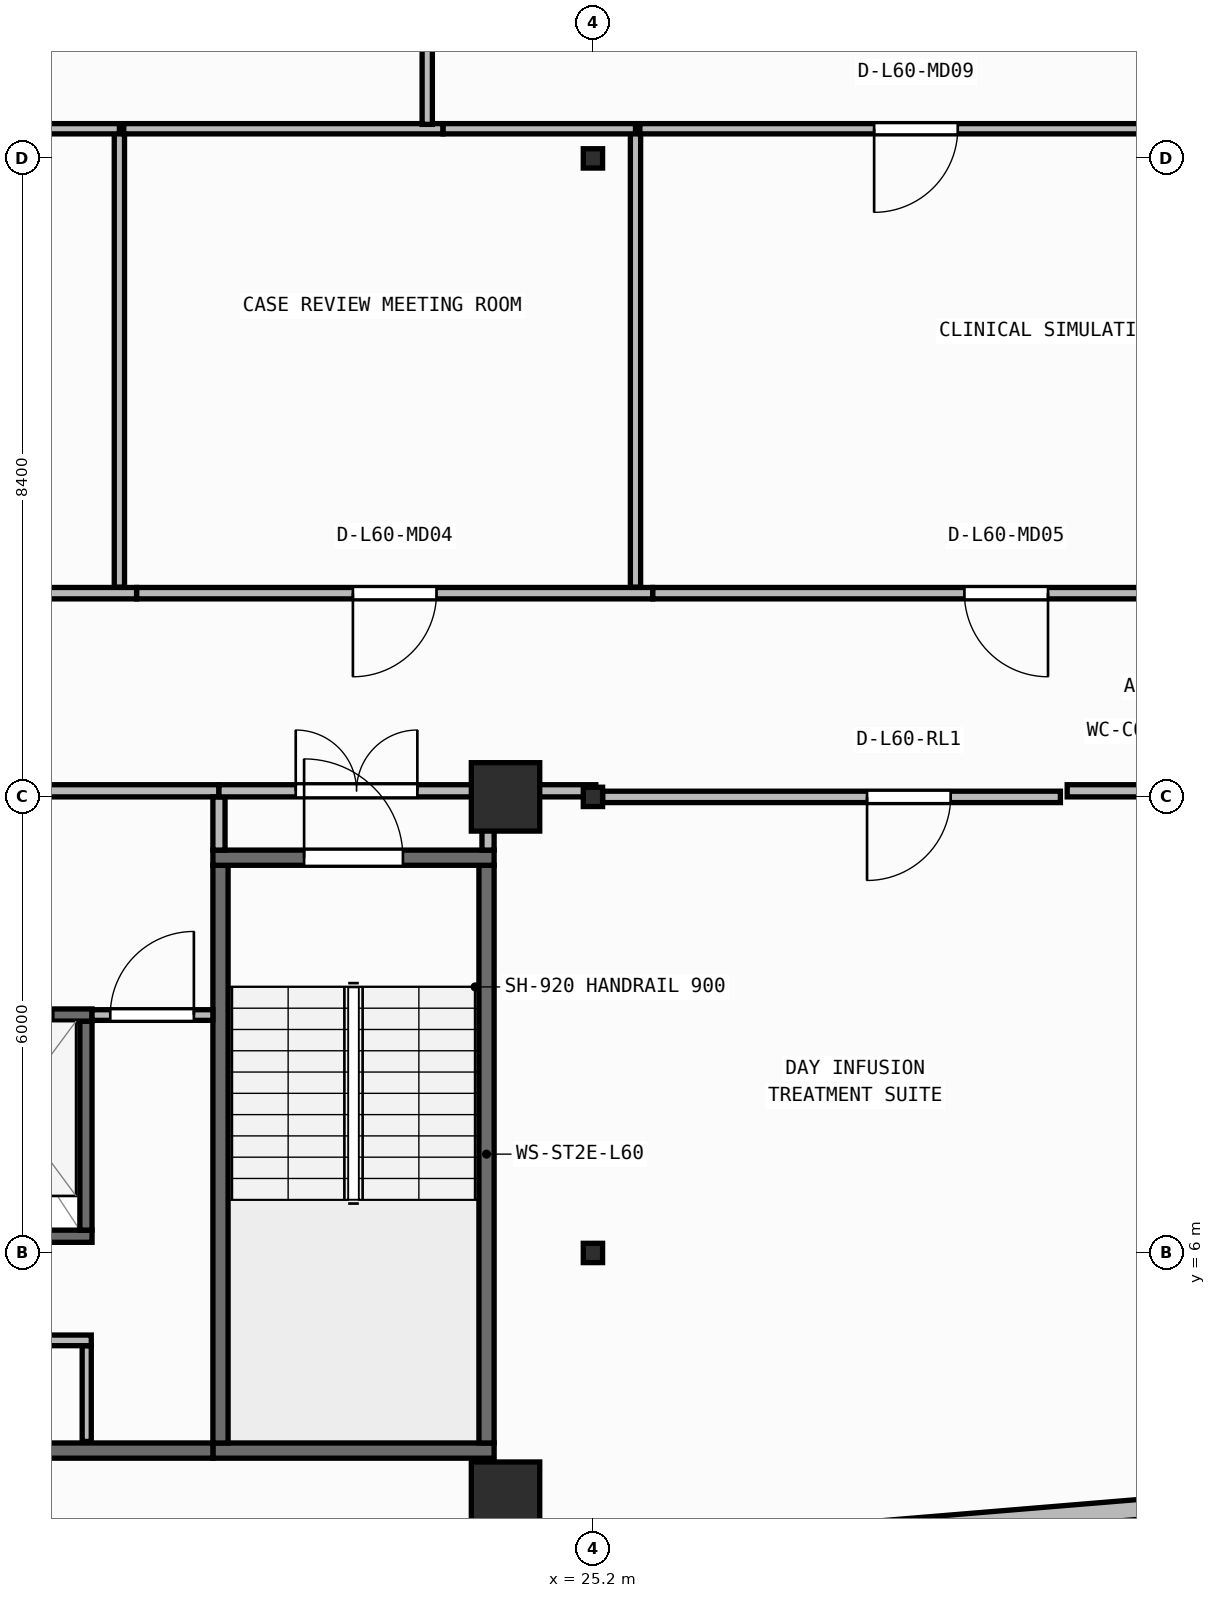
"""IFC4 building model, lengths in metres.
Left out: names, types, materials, properties, quantities, classifications, styles, units other than length and angle.
Written with IfcOpenShell. Run it as: python <this file> out.ifc"""

import sys

from ifc_helpers import new_model, si_unit, direction, frame, frame_2d, origin, origin_2d, place, context, subcontext, project, spatial, rectangle, i_section, extrude, element, fill, save


model = new_model("IFC4")
c1 = context("Model", 3, precision=1e-05, world=origin(), true_north=direction((0.0, 1.0)))
c2 = subcontext(c1, "Body", "Model", "MODEL_VIEW")
j1 = project(units=[si_unit("LENGTHUNIT", "METRE"), si_unit("PLANEANGLEUNIT", "RADIAN")], contexts=[c1])
p1 = place(None, origin())
s1 = spatial("IfcSite", under=j1, at=p1, CompositionType="ELEMENT")
p2 = place(p1, origin())
s2 = spatial("IfcBuilding", under=s1, at=p2, CompositionType="ELEMENT")
p3 = place(p2, frame((0.0, 0.0, 244.7)))
s3 = spatial("IfcBuildingStorey", under=s2, at=p3, CompositionType="ELEMENT", Elevation=244.7)
p4 = place(p3, frame((24.05, 2.8, 0.0), z_axis=(0.0, 0.0, 1.0), x_axis=(1.0, 0.0, 0.0)))
e1 = element("IfcColumn", 1, at=p4, inside=s3, PredefinedType="COLUMN", context=c2, shape_type="SweptSolid", body=[
    extrude(rectangle(XDim=0.9, YDim=0.9, at=origin_2d()), origin(), (0.0, 0.0, 1.0), 3.95),
])
p5 = place(p3, frame((25.2, 6.0, 0.0), z_axis=(0.0, 0.0, 1.0), x_axis=(1.0, 0.0, 0.0)))
e2 = element("IfcColumn", 2, at=p5, inside=s3, PredefinedType="COLUMN", context=c2, shape_type="SweptSolid", body=[
    extrude(i_section(OverallWidth=0.254, OverallDepth=0.254, WebThickness=0.009, FlangeThickness=0.014, FilletRadius=0.013, at=origin_2d()), origin(), (0.0, 0.0, 1.0), 3.95),
])
p6 = place(p3, frame((24.05, 12.0, 0.0), z_axis=(0.0, 0.0, 1.0), x_axis=(1.0, 0.0, 0.0)))
e3 = element("IfcColumn", 3, at=p6, inside=s3, PredefinedType="COLUMN", context=c2, shape_type="SweptSolid", body=[
    extrude(rectangle(XDim=0.9, YDim=0.9, at=origin_2d()), origin(), (0.0, 0.0, 1.0), 3.95),
])
for number, where, z_axis, x_axis in (
    (4, (25.2, 12.0, 0.0), (0.0, 0.0, 1.0), (1.0, 0.0, 0.0)),
    (5, (25.2, 20.4, 0.0), (0.0, 0.0, 1.0), (1.0, 0.0, 0.0)),
):
    element("IfcColumn", number, at=place(p3, frame(where, z_axis=z_axis, x_axis=x_axis)), inside=s3, PredefinedType="COLUMN", context=c2, shape_type="SweptSolid", body=[
        extrude(i_section(OverallWidth=0.254, OverallDepth=0.254, WebThickness=0.009, FlangeThickness=0.014, FilletRadius=0.013, at=origin_2d()), origin(), (0.0, 0.0, 1.0), 3.95),
    ])
p7 = place(p3, frame((2.66, 0.174, 0.0), z_axis=(0.0, 0.0, 1.0), x_axis=(0.996611813627, 0.082248969229, 0.0)))
e6 = element("IfcWall", 6, at=p7, inside=s3, PredefinedType="STANDARD", context=c2, shape_type="SweptSolid", body=[
    extrude(rectangle(XDim=41.019, YDim=0.26, at=frame_2d((20.51, 0.0))), origin(), (0.0, 0.0, 1.0), 3.71),
])
p8 = place(p7, frame((19.31, 0.0, 0.9)))
e7 = element("IfcOpeningElement", 7, at=p8, cuts=e6, PredefinedType="OPENING", context=c2, shape_type="SweptSolid", body=[
    extrude(rectangle(XDim=2.4, YDim=1.65, at=frame_2d((1.2, 0.825))), frame((0.0, 0.14, 0.0), z_axis=(0.0, -1.0, 0.0), x_axis=(1.0, 0.0, 0.0)), (0.0, 0.0, 1.0), 0.28),
])
p9 = place(p3, frame((20.2, 3.4, 0.0), z_axis=(0.0, 0.0, 1.0), x_axis=(1.0, 0.0, 0.0)))
e8 = element("IfcWall", 8, at=p9, inside=s3, PredefinedType="SHEAR", context=c2, shape_type="SweptSolid", body=[
    extrude(rectangle(XDim=3.7, YDim=0.2, at=frame_2d((1.85, 0.0))), origin(), (0.0, 0.0, 1.0), 3.71),
])
for number, where, z_axis, x_axis in (
    (9, (20.3, 3.5, 0.0), (0.0, 0.0, 1.0), (0.0, 1.0, 0.0)),
    (10, (23.8, 3.5, 0.0), (0.0, 0.0, 1.0), (0.0, 1.0, 0.0)),
):
    element("IfcWall", number, at=place(p3, frame(where, z_axis=z_axis, x_axis=x_axis)), inside=s3, PredefinedType="SHEAR", context=c2, shape_type="SweptSolid", body=[
        extrude(rectangle(XDim=7.6, YDim=0.2, at=frame_2d((3.8, 0.0))), origin(), (0.0, 0.0, 1.0), 3.71),
    ])
p10 = place(p3, frame((20.2, 11.2, 0.0), z_axis=(0.0, 0.0, 1.0), x_axis=(1.0, 0.0, 0.0)))
e11 = element("IfcWall", 11, at=p10, inside=s3, PredefinedType="SHEAR", context=c2, shape_type="SweptSolid", body=[
    extrude(rectangle(XDim=3.7, YDim=0.2, at=frame_2d((1.85, 0.0))), origin(), (0.0, 0.0, 1.0), 3.71),
])
p11 = place(p10, frame((1.2, 0.0, 0.0)))
e12 = element("IfcOpeningElement", 12, at=p11, cuts=e11, PredefinedType="OPENING", context=c2, shape_type="SweptSolid", body=[
    extrude(rectangle(XDim=1.3, YDim=2.15, at=frame_2d((0.65, 1.075))), frame((0.0, 0.11, 0.0), z_axis=(0.0, -1.0, 0.0), x_axis=(1.0, 0.0, 0.0)), (0.0, 0.0, 1.0), 0.22),
])
p12 = place(p3, frame((6.5, 3.4, 0.0), z_axis=(0.0, 0.0, 1.0), x_axis=(1.0, 0.0, 0.0)))
e13 = element("IfcWall", 13, at=p12, inside=s3, PredefinedType="SHEAR", context=c2, shape_type="SweptSolid", body=[
    extrude(rectangle(XDim=13.7, YDim=0.2, at=frame_2d((6.85, 0.0))), origin(), (0.0, 0.0, 1.0), 3.71),
])
p13 = place(p3, frame((6.5, 6.22, 0.0), z_axis=(0.0, 0.0, 1.0), x_axis=(1.0, 0.0, 0.0)))
e14 = element("IfcWall", 14, at=p13, inside=s3, PredefinedType="SHEAR", context=c2, shape_type="SweptSolid", body=[
    extrude(rectangle(XDim=12.11, YDim=0.16, at=frame_2d((6.055, 0.0))), origin(), (0.0, 0.0, 1.0), 3.71),
])
p14 = place(p3, frame((18.53, 6.3, 0.0), z_axis=(0.0, 0.0, 1.0), x_axis=(0.0, 1.0, 0.0)))
e15 = element("IfcWall", 15, at=p14, inside=s3, PredefinedType="SHEAR", context=c2, shape_type="SweptSolid", body=[
    extrude(rectangle(XDim=2.75, YDim=0.16, at=frame_2d((1.375, 0.0))), origin(), (0.0, 0.0, 1.0), 3.71),
])
p15 = place(p3, frame((16.575, 9.13, 0.0), z_axis=(0.0, 0.0, 1.0), x_axis=(1.0, 0.0, 0.0)))
e16 = element("IfcWall", 16, at=p15, inside=s3, PredefinedType="SHEAR", context=c2, shape_type="SweptSolid", body=[
    extrude(rectangle(XDim=2.035, YDim=0.16, at=frame_2d((1.018, 0.0))), origin(), (0.0, 0.0, 1.0), 3.71),
])
p16 = place(p15, frame((0.425, 0.0, 0.0)))
e17 = element("IfcOpeningElement", 17, at=p16, cuts=e16, PredefinedType="OPENING", context=c2, shape_type="SweptSolid", body=[
    extrude(rectangle(XDim=1.1, YDim=2.15, at=frame_2d((0.55, 1.075))), frame((0.0, 0.09, 0.0), z_axis=(0.0, -1.0, 0.0), x_axis=(1.0, 0.0, 0.0)), (0.0, 0.0, 1.0), 0.18),
])
p17 = place(p3, frame((18.54, 3.52, 0.0), z_axis=(0.0, 0.0, 1.0), x_axis=(0.0, 1.0, 0.0)))
e18 = element("IfcWall", 18, at=p17, inside=s3, PredefinedType="PARTITIONING", context=c2, shape_type="SweptSolid", body=[
    extrude(rectangle(XDim=1.26, YDim=0.12, at=frame_2d((0.63, 0.0))), origin(), (0.0, 0.0, 1.0), 3.71),
])
p18 = place(p3, frame((14.6, 4.85, 0.0), z_axis=(0.0, 0.0, 1.0), x_axis=(1.0, 0.0, 0.0)))
e19 = element("IfcWall", 19, at=p18, inside=s3, PredefinedType="PARTITIONING", context=c2, shape_type="SweptSolid", body=[
    extrude(rectangle(XDim=4.0, YDim=0.14, at=frame_2d((2.0, 0.0))), origin(), (0.0, 0.0, 1.0), 3.71),
])
p19 = place(p18, frame((1.51, 0.0, 0.0)))
e20 = element("IfcOpeningElement", 20, at=p19, cuts=e19, PredefinedType="OPENING", context=c2, shape_type="SweptSolid", body=[
    extrude(rectangle(XDim=0.98, YDim=2.1, at=frame_2d((0.49, 1.05))), frame((0.0, 0.08, 0.0), z_axis=(0.0, -1.0, 0.0), x_axis=(1.0, 0.0, 0.0)), (0.0, 0.0, 1.0), 0.16),
])
p20 = place(p3, frame((18.61, 9.13, 0.0), z_axis=(0.0, 0.0, 1.0), x_axis=(1.0, 0.0, 0.0)))
e21 = element("IfcWall", 21, at=p20, inside=s3, PredefinedType="PARTITIONING", context=c2, shape_type="SweptSolid", body=[
    extrude(rectangle(XDim=1.59, YDim=0.14, at=frame_2d((0.795, 0.0))), origin(), (0.0, 0.0, 1.0), 3.71),
])
p21 = place(p20, frame((0.24, 0.0, 0.0)))
e22 = element("IfcOpeningElement", 22, at=p21, cuts=e21, PredefinedType="OPENING", context=c2, shape_type="SweptSolid", body=[
    extrude(rectangle(XDim=1.1, YDim=2.1, at=frame_2d((0.55, 1.05))), frame((0.0, 0.08, 0.0), z_axis=(0.0, -1.0, 0.0), x_axis=(1.0, 0.0, 0.0)), (0.0, 0.0, 1.0), 0.16),
])
p22 = place(p3, frame((12.58, 12.08, 0.0), z_axis=(0.0, 0.0, 1.0), x_axis=(1.0, 0.0, 0.0)))
e23 = element("IfcWall", 23, at=p22, inside=s3, PredefinedType="PARTITIONING", context=c2, shape_type="SweptSolid", body=[
    extrude(rectangle(XDim=7.7, YDim=0.16, at=frame_2d((3.85, 0.0))), origin(), (0.0, 0.0, 1.0), 3.157),
])
p23 = place(p22, frame((3.05, 0.0, 0.0)))
e24 = element("IfcOpeningElement", 24, at=p23, cuts=e23, PredefinedType="OPENING", context=c2, shape_type="SweptSolid", body=[
    extrude(rectangle(XDim=1.6, YDim=2.05, at=frame_2d((0.8, 1.025))), frame((0.0, 0.09, 0.0), z_axis=(0.0, -1.0, 0.0), x_axis=(1.0, 0.0, 0.0)), (0.0, 0.0, 1.0), 0.18),
])
p24 = place(p3, frame((20.28, 11.3, 0.0), z_axis=(0.0, 0.0, 1.0), x_axis=(0.0, 1.0, 0.0)))
e25 = element("IfcWall", 25, at=p24, inside=s3, PredefinedType="PARTITIONING", context=c2, shape_type="SweptSolid", body=[
    extrude(rectangle(XDim=0.7, YDim=0.16, at=frame_2d((0.35, 0.0))), origin(), (0.0, 0.0, 1.0), 3.71),
])
p25 = place(p3, frame((20.28, 12.08, 0.0), z_axis=(0.0, 0.0, 1.0), x_axis=(1.0, 0.0, 0.0)))
e26 = element("IfcWall", 26, at=p25, inside=s3, PredefinedType="PARTITIONING", context=c2, shape_type="SweptSolid", body=[
    extrude(rectangle(XDim=3.62, YDim=0.16, at=frame_2d((1.81, 0.0))), origin(), (0.0, 0.0, 1.0), 3.157),
])
p26 = place(p25, frame((1.01, 0.0, 0.0)))
e27 = element("IfcOpeningElement", 27, at=p26, cuts=e26, PredefinedType="OPENING", context=c2, shape_type="SweptSolid", body=[
    extrude(rectangle(XDim=1.6, YDim=2.05, at=frame_2d((0.8, 1.025))), frame((0.0, 0.09, 0.0), z_axis=(0.0, -1.0, 0.0), x_axis=(1.0, 0.0, 0.0)), (0.0, 0.0, 1.0), 0.18),
])
p27 = place(p3, frame((23.82, 11.3, 0.0), z_axis=(0.0, 0.0, 1.0), x_axis=(0.0, 1.0, 0.0)))
e28 = element("IfcWall", 28, at=p27, inside=s3, PredefinedType="PARTITIONING", context=c2, shape_type="SweptSolid", body=[
    extrude(rectangle(XDim=0.7, YDim=0.16, at=frame_2d((0.35, 0.0))), origin(), (0.0, 0.0, 1.0), 3.71),
])
p28 = place(p3, frame((31.35, 12.0, 0.0), z_axis=(0.0, 0.0, 1.0), x_axis=(-1.0, 0.0, 0.0)))
e29 = element("IfcWall", 29, at=p28, inside=s3, PredefinedType="PARTITIONING", context=c2, shape_type="SweptSolid", body=[
    extrude(rectangle(XDim=6.023, YDim=0.15, at=frame_2d((3.012, 0.0))), origin(), (0.0, 0.0, 1.0), 3.157),
])
p29 = place(p28, frame((1.444, 0.0, 0.0)))
e30 = element("IfcOpeningElement", 30, at=p29, cuts=e29, PredefinedType="OPENING", context=c2, shape_type="SweptSolid", body=[
    extrude(rectangle(XDim=1.1, YDim=2.1, at=frame_2d((0.55, 1.05))), frame((0.0, 0.085, 0.0), z_axis=(0.0, -1.0, 0.0), x_axis=(1.0, 0.0, 0.0)), (0.0, 0.0, 1.0), 0.17),
])
p30 = place(p3, frame((19.196, 14.68, 0.0), z_axis=(0.0, 0.0, 1.0), x_axis=(-1.0, 0.0, 0.0)))
e31 = element("IfcWall", 31, at=p30, inside=s3, PredefinedType="PARTITIONING", context=c2, shape_type="SweptSolid", body=[
    extrude(rectangle(XDim=5.642, YDim=0.15, at=frame_2d((2.821, 0.0))), origin(), (0.0, 0.0, 1.0), 3.71),
])
p31 = place(p30, frame((2.271, 0.0, 0.0)))
e32 = element("IfcOpeningElement", 32, at=p31, cuts=e31, PredefinedType="OPENING", context=c2, shape_type="SweptSolid", body=[
    extrude(rectangle(XDim=1.1, YDim=2.1, at=frame_2d((0.55, 1.05))), frame((0.0, 0.085, 0.0), z_axis=(0.0, -1.0, 0.0), x_axis=(1.0, 0.0, 0.0)), (0.0, 0.0, 1.0), 0.17),
])
p32 = place(p3, frame((25.986, 14.68, 0.0), z_axis=(0.0, 0.0, 1.0), x_axis=(-1.0, 0.0, 0.0)))
e33 = element("IfcWall", 33, at=p32, inside=s3, PredefinedType="PARTITIONING", context=c2, shape_type="SweptSolid", body=[
    extrude(rectangle(XDim=6.788, YDim=0.15, at=frame_2d((3.394, 0.0))), origin(), (0.0, 0.0, 1.0), 3.71),
])
p33 = place(p32, frame((2.844, 0.0, 0.0)))
e34 = element("IfcOpeningElement", 34, at=p33, cuts=e33, PredefinedType="OPENING", context=c2, shape_type="SweptSolid", body=[
    extrude(rectangle(XDim=1.1, YDim=2.1, at=frame_2d((0.55, 1.05))), frame((0.0, 0.085, 0.0), z_axis=(0.0, -1.0, 0.0), x_axis=(1.0, 0.0, 0.0)), (0.0, 0.0, 1.0), 0.17),
])
p34 = place(p3, frame((35.286, 14.68, 0.0), z_axis=(0.0, 0.0, 1.0), x_axis=(-1.0, 0.0, 0.0)))
e35 = element("IfcWall", 35, at=p34, inside=s3, PredefinedType="PARTITIONING", context=c2, shape_type="SweptSolid", body=[
    extrude(rectangle(XDim=9.298, YDim=0.15, at=frame_2d((4.649, 0.0))), origin(), (0.0, 0.0, 1.0), 3.71),
])
p35 = place(p34, frame((4.099, 0.0, 0.0)))
e36 = element("IfcOpeningElement", 36, at=p35, cuts=e35, PredefinedType="OPENING", context=c2, shape_type="SweptSolid", body=[
    extrude(rectangle(XDim=1.1, YDim=2.1, at=frame_2d((0.55, 1.05))), frame((0.0, 0.085, 0.0), z_axis=(0.0, -1.0, 0.0), x_axis=(1.0, 0.0, 0.0)), (0.0, 0.0, 1.0), 0.17),
])
p36 = place(p3, frame((18.97, 14.76, 0.0), z_axis=(0.0, 0.0, 1.0), x_axis=(0.0, 1.0, 0.0)))
e37 = element("IfcWall", 37, at=p36, inside=s3, PredefinedType="PARTITIONING", context=c2, shape_type="SweptSolid", body=[
    extrude(rectangle(XDim=6.03, YDim=0.135, at=frame_2d((3.015, 0.0))), origin(), (0.0, 0.0, 1.0), 3.71),
])
p37 = place(p3, frame((18.97, 20.79, 0.0), z_axis=(0.0, 0.0, 1.0), x_axis=(-1.0, 0.0, 0.0)))
e38 = element("IfcWall", 38, at=p37, inside=s3, PredefinedType="PARTITIONING", context=c2, shape_type="SweptSolid", body=[
    extrude(rectangle(XDim=5.19, YDim=0.135, at=frame_2d((2.595, 0.0))), origin(), (0.0, 0.0, 1.0), 3.157),
])
p38 = place(p3, frame((25.76, 14.76, 0.0), z_axis=(0.0, 0.0, 1.0), x_axis=(0.0, 1.0, 0.0)))
e39 = element("IfcWall", 39, at=p38, inside=s3, PredefinedType="PARTITIONING", context=c2, shape_type="SweptSolid", body=[
    extrude(rectangle(XDim=6.03, YDim=0.135, at=frame_2d((3.015, 0.0))), origin(), (0.0, 0.0, 1.0), 3.71),
])
p39 = place(p3, frame((23.228, 20.79, 0.0), z_axis=(0.0, 0.0, 1.0), x_axis=(-1.0, 0.0, 0.0)))
e40 = element("IfcWall", 40, at=p39, inside=s3, PredefinedType="PARTITIONING", context=c2, shape_type="SweptSolid", body=[
    extrude(rectangle(XDim=4.2, YDim=0.135, at=frame_2d((2.1, 0.0))), origin(), (0.0, 0.0, 1.0), 3.157),
])
p40 = place(p3, frame((25.76, 20.79, 0.0), z_axis=(0.0, 0.0, 1.0), x_axis=(-1.0, 0.0, 0.0)))
e41 = element("IfcWall", 41, at=p40, inside=s3, PredefinedType="PARTITIONING", context=c2, shape_type="SweptSolid", body=[
    extrude(rectangle(XDim=2.531, YDim=0.135, at=frame_2d((1.265, 0.0))), origin(), (0.0, 0.0, 1.0), 3.157),
])
p41 = place(p3, frame((35.002, 20.79, 0.0), z_axis=(0.0, 0.0, 1.0), x_axis=(-1.0, 0.0, 0.0)))
e42 = element("IfcWall", 42, at=p41, inside=s3, PredefinedType="PARTITIONING", context=c2, shape_type="SweptSolid", body=[
    extrude(rectangle(XDim=9.185, YDim=0.135, at=frame_2d((4.593, 0.0))), origin(), (0.0, 0.0, 1.0), 3.157),
])
p42 = place(p41, frame((5.003, 0.0, 0.0)))
e43 = element("IfcOpeningElement", 43, at=p42, cuts=e42, PredefinedType="OPENING", context=c2, shape_type="SweptSolid", body=[
    extrude(rectangle(XDim=1.1, YDim=2.1, at=frame_2d((0.55, 1.05))), frame((0.0, 0.077, 0.0), z_axis=(0.0, -1.0, 0.0), x_axis=(1.0, 0.0, 0.0)), (0.0, 0.0, 1.0), 0.155),
])
p43 = place(p3, frame((23.02, 20.847, 0.0), z_axis=(0.0, 0.0, 1.0), x_axis=(0.0, 1.0, 0.0)))
e44 = element("IfcWall", 44, at=p43, inside=s3, PredefinedType="PARTITIONING", context=c2, shape_type="SweptSolid", body=[
    extrude(rectangle(XDim=6.292, YDim=0.135, at=frame_2d((3.146, 0.0))), origin(), (0.0, 0.0, 1.0), 3.71),
])
p44 = place(p3, frame((24.02, 12.08, 0.0), z_axis=(0.0, 0.0, 1.0), x_axis=(1.0, 0.0, 0.0)))
e45 = element("IfcWall", 45, at=p44, inside=s3, PredefinedType="PARTITIONING", context=c2, shape_type="SweptSolid", body=[
    extrude(rectangle(XDim=1.218, YDim=0.16, at=frame_2d((0.609, 0.0))), origin(), (0.0, 0.0, 1.0), 3.157),
])
p45 = place(p3, frame((31.439, 12.08, 0.0), z_axis=(0.0, 0.0, 1.0), x_axis=(1.0, 0.0, 0.0)))
e46 = element("IfcWall", 46, at=p45, inside=s3, PredefinedType="PARTITIONING", context=c2, shape_type="SweptSolid", body=[
    extrude(rectangle(XDim=2.198, YDim=0.16, at=frame_2d((1.099, 0.0))), origin(), (0.0, 0.0, 1.0), 3.157),
])
p46 = place(p11, origin())
e47 = element("IfcDoor", 47, at=p46, inside=s3, OperationType="SINGLE_SWING_LEFT", PredefinedType="DOOR", context=c2, shape_type="SweptSolid", body=[
    extrude(rectangle(XDim=1.3, YDim=2.15, at=frame_2d((0.65, 1.075))), frame((0.0, 0.025, 0.0), z_axis=(0.0, -1.0, 0.0), x_axis=(1.0, 0.0, 0.0)), (0.0, 0.0, 1.0), 0.05),
])
fill(e12, e47)
p47 = place(p16, origin())
e48 = element("IfcDoor", 48, at=p47, inside=s3, OperationType="SLIDING_TO_LEFT", PredefinedType="DOOR", context=c2, shape_type="SweptSolid", body=[
    extrude(rectangle(XDim=1.1, YDim=2.15, at=frame_2d((0.55, 1.075))), frame((0.0, 0.025, 0.0), z_axis=(0.0, -1.0, 0.0), x_axis=(1.0, 0.0, 0.0)), (0.0, 0.0, 1.0), 0.05),
])
fill(e17, e48)
p48 = place(p21, origin())
e49 = element("IfcDoor", 49, at=p48, inside=s3, OperationType="SINGLE_SWING_RIGHT", PredefinedType="DOOR", context=c2, shape_type="SweptSolid", body=[
    extrude(rectangle(XDim=1.1, YDim=2.1, at=frame_2d((0.55, 1.05))), frame((0.0, 0.025, 0.0), z_axis=(0.0, -1.0, 0.0), x_axis=(1.0, 0.0, 0.0)), (0.0, 0.0, 1.0), 0.05),
])
fill(e22, e49)
p49 = place(p26, origin())
e50 = element("IfcDoor", 50, at=p49, inside=s3, OperationType="DOUBLE_DOOR_SINGLE_SWING", PredefinedType="DOOR", context=c2, shape_type="SweptSolid", body=[
    extrude(rectangle(XDim=1.6, YDim=2.05, at=frame_2d((0.8, 1.025))), frame((0.0, 0.025, 0.0), z_axis=(0.0, -1.0, 0.0), x_axis=(1.0, 0.0, 0.0)), (0.0, 0.0, 1.0), 0.05),
])
fill(e27, e50)
p50 = place(p29, origin())
e51 = element("IfcDoor", 51, at=p50, inside=s3, OperationType="SINGLE_SWING_RIGHT", PredefinedType="DOOR", context=c2, shape_type="SweptSolid", body=[
    extrude(rectangle(XDim=1.1, YDim=2.1, at=frame_2d((0.55, 1.05))), frame((0.0, 0.025, 0.0), z_axis=(0.0, -1.0, 0.0), x_axis=(1.0, 0.0, 0.0)), (0.0, 0.0, 1.0), 0.05),
])
fill(e30, e51)
p51 = place(p33, origin())
e52 = element("IfcDoor", 52, at=p51, inside=s3, OperationType="SINGLE_SWING_RIGHT", PredefinedType="DOOR", context=c2, shape_type="SweptSolid", body=[
    extrude(rectangle(XDim=1.1, YDim=2.1, at=frame_2d((0.55, 1.05))), frame((0.0, 0.025, 0.0), z_axis=(0.0, -1.0, 0.0), x_axis=(1.0, 0.0, 0.0)), (0.0, 0.0, 1.0), 0.05),
])
fill(e34, e52)
p52 = place(p35, origin())
e53 = element("IfcDoor", 53, at=p52, inside=s3, OperationType="SINGLE_SWING_LEFT", PredefinedType="DOOR", context=c2, shape_type="SweptSolid", body=[
    extrude(rectangle(XDim=1.1, YDim=2.1, at=frame_2d((0.55, 1.05))), frame((0.0, 0.025, 0.0), z_axis=(0.0, -1.0, 0.0), x_axis=(1.0, 0.0, 0.0)), (0.0, 0.0, 1.0), 0.05),
])
fill(e36, e53)
p53 = place(p42, origin())
e54 = element("IfcDoor", 54, at=p53, inside=s3, OperationType="SINGLE_SWING_RIGHT", PredefinedType="DOOR", context=c2, shape_type="SweptSolid", body=[
    extrude(rectangle(XDim=1.1, YDim=2.1, at=frame_2d((0.55, 1.05))), frame((0.0, 0.025, 0.0), z_axis=(0.0, -1.0, 0.0), x_axis=(1.0, 0.0, 0.0)), (0.0, 0.0, 1.0), 0.05),
])
fill(e43, e54)
save(model, sys.argv[1])
